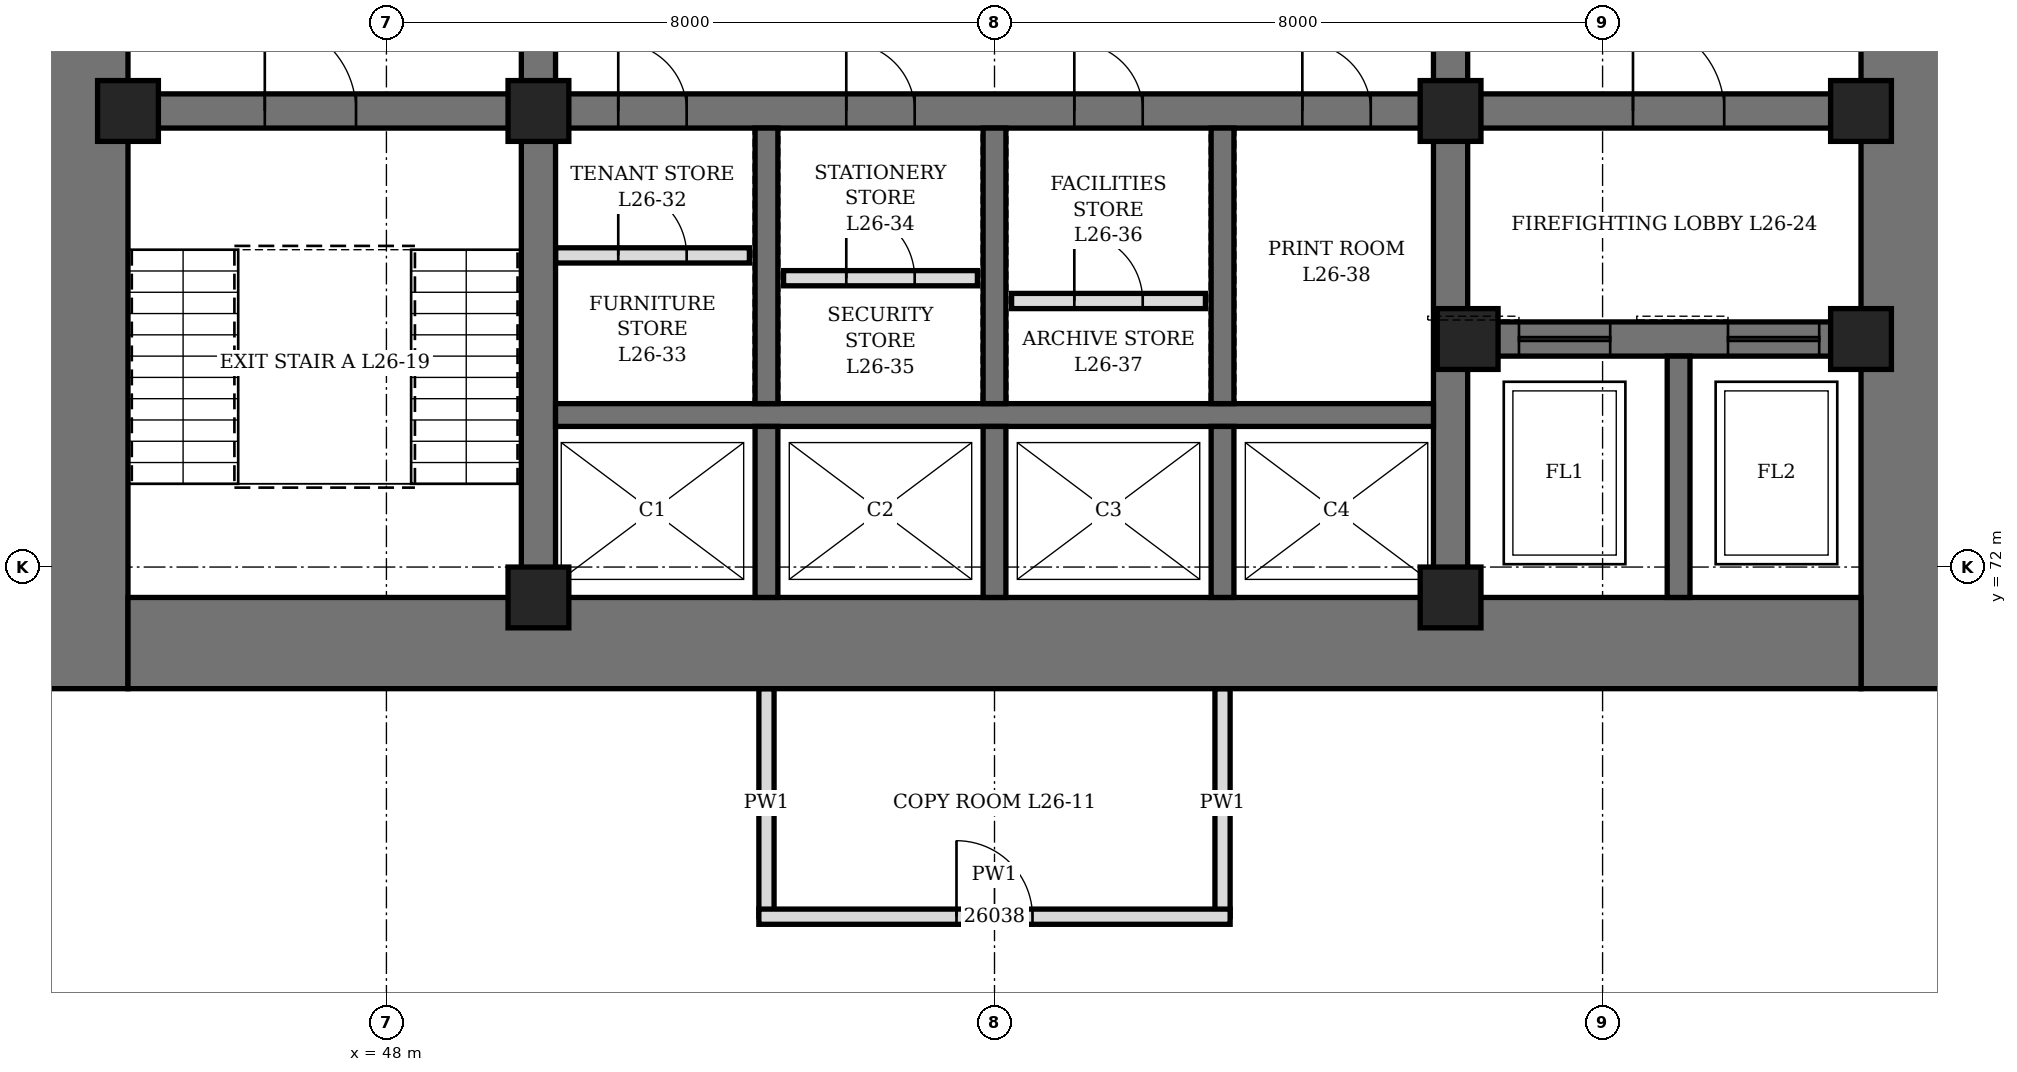
"""IFC4 building model, lengths in metres.
Left out: names, types, materials, properties, quantities, classifications, styles, units other than length and angle.
Written with IfcOpenShell. Run it as: python <this file> out.ifc"""

import sys

from ifc_helpers import new_model, si_unit, direction, frame, frame_2d, origin, origin_2d, place, context, subcontext, project, spatial, rectangle, hollow_rectangle, extrude, element, fill, save


model = new_model("IFC4")
c1 = context("Model", 3, precision=1e-05, world=origin(), true_north=direction((0.0, 1.0)))
c2 = subcontext(c1, "Body", "Model", "MODEL_VIEW")
j1 = project(units=[si_unit("LENGTHUNIT", "METRE"), si_unit("PLANEANGLEUNIT", "RADIAN")], contexts=[c1])
p1 = place(None, origin())
s1 = spatial("IfcSite", under=j1, at=p1, CompositionType="ELEMENT")
p2 = place(p1, origin())
s2 = spatial("IfcBuilding", under=s1, at=p2, CompositionType="ELEMENT")
p3 = place(p2, frame((0.0, 0.0, 120.7)))
s3 = spatial("IfcBuildingStorey", under=s2, at=p3, CompositionType="ELEMENT", Elevation=120.7)
p4 = place(p3, frame((44.0, 70.4, 0.0), z_axis=(0.0, 0.0, 1.0), x_axis=(0.0, 1.0, 0.0)))
e1 = element("IfcWall", 1, at=p4, inside=s3, PredefinedType="SHEAR", context=c2, shape_type="SweptSolid", body=[
    extrude(rectangle(XDim=19.2, YDim=1.2, at=frame_2d((9.6, 0.0))), origin(), (0.0, 0.0, 1.0), 4.2),
])
p5 = place(p4, frame((8.6, 0.0, 0.0)))
e2 = element("IfcOpeningElement", 2, at=p5, cuts=e1, PredefinedType="OPENING", context=c2, shape_type="SweptSolid", body=[
    extrude(rectangle(XDim=2.0, YDim=2.4, at=frame_2d((1.0, 1.2))), frame((0.0, 0.61, 0.0), z_axis=(0.0, -1.0, 0.0), x_axis=(1.0, 0.0, 0.0)), (0.0, 0.0, 1.0), 1.22),
])
p6 = place(p3, frame((68.0, 70.4, 0.0), z_axis=(0.0, 0.0, 1.0), x_axis=(0.0, 1.0, 0.0)))
e3 = element("IfcWall", 3, at=p6, inside=s3, PredefinedType="SHEAR", context=c2, shape_type="SweptSolid", body=[
    extrude(rectangle(XDim=19.2, YDim=1.2, at=frame_2d((9.6, 0.0))), origin(), (0.0, 0.0, 1.0), 4.2),
])
p7 = place(p6, frame((8.6, 0.0, 0.0)))
e4 = element("IfcOpeningElement", 4, at=p7, cuts=e3, PredefinedType="OPENING", context=c2, shape_type="SweptSolid", body=[
    extrude(rectangle(XDim=2.0, YDim=2.4, at=frame_2d((1.0, 1.2))), frame((0.0, 0.61, 0.0), z_axis=(0.0, -1.0, 0.0), x_axis=(1.0, 0.0, 0.0)), (0.0, 0.0, 1.0), 1.22),
])
p8 = place(p3, frame((44.6, 71.0, 0.0), z_axis=(0.0, 0.0, 1.0), x_axis=(1.0, 0.0, 0.0)))
e5 = element("IfcWall", 5, at=p8, inside=s3, PredefinedType="SHEAR", context=c2, shape_type="SweptSolid", body=[
    extrude(rectangle(XDim=22.8, YDim=1.2, at=frame_2d((11.4, 0.0))), origin(), (0.0, 0.0, 1.0), 4.2),
])
p9 = place(p3, frame((50.0, 71.6, 0.0), z_axis=(0.0, 0.0, 1.0), x_axis=(0.0, 1.0, 0.0)))
e6 = element("IfcWall", 6, at=p9, inside=s3, PredefinedType="SHEAR", context=c2, shape_type="SweptSolid", body=[
    extrude(rectangle(XDim=16.8, YDim=0.45, at=frame_2d((8.4, 0.0))), origin(), (0.0, 0.0, 1.0), 4.2),
])
p10 = place(p9, frame((7.5, 0.0, 0.0)))
e7 = element("IfcOpeningElement", 7, at=p10, cuts=e6, PredefinedType="OPENING", context=c2, shape_type="SweptSolid", body=[
    extrude(rectangle(XDim=1.8, YDim=2.4, at=frame_2d((0.9, 1.2))), frame((0.0, 0.235, 0.0), z_axis=(0.0, -1.0, 0.0), x_axis=(1.0, 0.0, 0.0)), (0.0, 0.0, 1.0), 0.47),
])
p11 = place(p3, frame((62.0, 71.6, 0.0), z_axis=(0.0, 0.0, 1.0), x_axis=(0.0, 1.0, 0.0)))
e8 = element("IfcWall", 8, at=p11, inside=s3, PredefinedType="SHEAR", context=c2, shape_type="SweptSolid", body=[
    extrude(rectangle(XDim=16.8, YDim=0.45, at=frame_2d((8.4, 0.0))), origin(), (0.0, 0.0, 1.0), 4.2),
])
p12 = place(p11, frame((7.5, 0.0, 0.0)))
e9 = element("IfcOpeningElement", 9, at=p12, cuts=e8, PredefinedType="OPENING", context=c2, shape_type="SweptSolid", body=[
    extrude(rectangle(XDim=1.8, YDim=2.4, at=frame_2d((0.9, 1.2))), frame((0.0, 0.235, 0.0), z_axis=(0.0, -1.0, 0.0), x_axis=(1.0, 0.0, 0.0)), (0.0, 0.0, 1.0), 0.47),
])
p13 = place(p3, frame((44.6, 78.0, 0.0), z_axis=(0.0, 0.0, 1.0), x_axis=(1.0, 0.0, 0.0)))
e10 = element("IfcWall", 10, at=p13, inside=s3, PredefinedType="SHEAR", context=c2, shape_type="SweptSolid", body=[
    extrude(rectangle(XDim=5.175, YDim=0.45, at=frame_2d((2.587, 0.0))), origin(), (0.0, 0.0, 1.0), 4.2),
])
p14 = place(p13, frame((1.8, 0.0, 0.0)))
e11 = element("IfcOpeningElement", 11, at=p14, cuts=e10, PredefinedType="OPENING", context=c2, shape_type="SweptSolid", body=[
    extrude(rectangle(XDim=1.2, YDim=2.1, at=frame_2d((0.6, 1.05))), frame((0.0, 0.235, 0.0), z_axis=(0.0, -1.0, 0.0), x_axis=(1.0, 0.0, 0.0)), (0.0, 0.0, 1.0), 0.47),
])
p15 = place(p3, frame((62.225, 75.0, 0.0), z_axis=(0.0, 0.0, 1.0), x_axis=(1.0, 0.0, 0.0)))
e12 = element("IfcWall", 12, at=p15, inside=s3, PredefinedType="SHEAR", context=c2, shape_type="SweptSolid", body=[
    extrude(rectangle(XDim=5.175, YDim=0.45, at=frame_2d((2.587, 0.0))), origin(), (0.0, 0.0, 1.0), 4.2),
])
p16 = place(p15, frame((0.675, 0.0, 0.0)))
e13 = element("IfcOpeningElement", 13, at=p16, cuts=e12, PredefinedType="OPENING", context=c2, shape_type="SweptSolid", body=[
    extrude(rectangle(XDim=1.2, YDim=2.2, at=frame_2d((0.6, 1.1))), frame((0.0, 0.235, 0.0), z_axis=(0.0, -1.0, 0.0), x_axis=(1.0, 0.0, 0.0)), (0.0, 0.0, 1.0), 0.47),
])
p17 = place(p15, frame((3.425, 0.0, 0.0)))
e14 = element("IfcOpeningElement", 14, at=p17, cuts=e12, PredefinedType="OPENING", context=c2, shape_type="SweptSolid", body=[
    extrude(rectangle(XDim=1.2, YDim=2.2, at=frame_2d((0.6, 1.1))), frame((0.0, 0.235, 0.0), z_axis=(0.0, -1.0, 0.0), x_axis=(1.0, 0.0, 0.0)), (0.0, 0.0, 1.0), 0.47),
])
p18 = place(p3, frame((62.225, 78.0, 0.0), z_axis=(0.0, 0.0, 1.0), x_axis=(1.0, 0.0, 0.0)))
e15 = element("IfcWall", 15, at=p18, inside=s3, PredefinedType="SHEAR", context=c2, shape_type="SweptSolid", body=[
    extrude(rectangle(XDim=5.175, YDim=0.45, at=frame_2d((2.587, 0.0))), origin(), (0.0, 0.0, 1.0), 4.2),
])
p19 = place(p18, frame((2.175, 0.0, 0.0)))
e16 = element("IfcOpeningElement", 16, at=p19, cuts=e15, PredefinedType="OPENING", context=c2, shape_type="SweptSolid", body=[
    extrude(rectangle(XDim=1.2, YDim=2.1, at=frame_2d((0.6, 1.05))), frame((0.0, 0.235, 0.0), z_axis=(0.0, -1.0, 0.0), x_axis=(1.0, 0.0, 0.0)), (0.0, 0.0, 1.0), 0.47),
])
p20 = place(p3, frame((50.225, 78.0, 0.0), z_axis=(0.0, 0.0, 1.0), x_axis=(1.0, 0.0, 0.0)))
e17 = element("IfcWall", 17, at=p20, inside=s3, PredefinedType="SHEAR", context=c2, shape_type="SweptSolid", body=[
    extrude(rectangle(XDim=11.55, YDim=0.45, at=frame_2d((5.775, 0.0))), origin(), (0.0, 0.0, 1.0), 4.2),
])
p21 = place(p20, frame((0.825, 0.0, 0.0)))
e18 = element("IfcOpeningElement", 18, at=p21, cuts=e17, PredefinedType="OPENING", context=c2, shape_type="SweptSolid", body=[
    extrude(rectangle(XDim=0.9, YDim=2.1, at=frame_2d((0.45, 1.05))), frame((0.0, 0.235, 0.0), z_axis=(0.0, -1.0, 0.0), x_axis=(1.0, 0.0, 0.0)), (0.0, 0.0, 1.0), 0.47),
])
p22 = place(p20, frame((3.825, 0.0, 0.0)))
e19 = element("IfcOpeningElement", 19, at=p22, cuts=e17, PredefinedType="OPENING", context=c2, shape_type="SweptSolid", body=[
    extrude(rectangle(XDim=0.9, YDim=2.1, at=frame_2d((0.45, 1.05))), frame((0.0, 0.235, 0.0), z_axis=(0.0, -1.0, 0.0), x_axis=(1.0, 0.0, 0.0)), (0.0, 0.0, 1.0), 0.47),
])
p23 = place(p20, frame((6.825, 0.0, 0.0)))
e20 = element("IfcOpeningElement", 20, at=p23, cuts=e17, PredefinedType="OPENING", context=c2, shape_type="SweptSolid", body=[
    extrude(rectangle(XDim=0.9, YDim=2.1, at=frame_2d((0.45, 1.05))), frame((0.0, 0.235, 0.0), z_axis=(0.0, -1.0, 0.0), x_axis=(1.0, 0.0, 0.0)), (0.0, 0.0, 1.0), 0.47),
])
p24 = place(p20, frame((9.825, 0.0, 0.0)))
e21 = element("IfcOpeningElement", 21, at=p24, cuts=e17, PredefinedType="OPENING", context=c2, shape_type="SweptSolid", body=[
    extrude(rectangle(XDim=0.9, YDim=2.1, at=frame_2d((0.45, 1.05))), frame((0.0, 0.235, 0.0), z_axis=(0.0, -1.0, 0.0), x_axis=(1.0, 0.0, 0.0)), (0.0, 0.0, 1.0), 0.47),
])
p25 = place(p3, frame((50.225, 74.0, 0.0), z_axis=(0.0, 0.0, 1.0), x_axis=(1.0, 0.0, 0.0)))
e22 = element("IfcWall", 22, at=p25, inside=s3, PredefinedType="SHEAR", context=c2, shape_type="SweptSolid", body=[
    extrude(rectangle(XDim=11.55, YDim=0.3, at=frame_2d((5.775, 0.0))), origin(), (0.0, 0.0, 1.0), 4.2),
])
p26 = place(p3, frame((53.0, 71.6, 0.0), z_axis=(0.0, 0.0, 1.0), x_axis=(0.0, 1.0, 0.0)))
e23 = element("IfcWall", 23, at=p26, inside=s3, PredefinedType="SHEAR", context=c2, shape_type="SweptSolid", body=[
    extrude(rectangle(XDim=2.25, YDim=0.3, at=frame_2d((1.125, 0.0))), origin(), (0.0, 0.0, 1.0), 4.2),
])
p27 = place(p3, frame((53.0, 74.15, 0.0), z_axis=(0.0, 0.0, 1.0), x_axis=(0.0, 1.0, 0.0)))
e24 = element("IfcWall", 24, at=p27, inside=s3, PredefinedType="SHEAR", context=c2, shape_type="SweptSolid", body=[
    extrude(rectangle(XDim=3.625, YDim=0.3, at=frame_2d((1.812, 0.0))), origin(), (0.0, 0.0, 1.0), 4.2),
])
p28 = place(p3, frame((56.0, 71.6, 0.0), z_axis=(0.0, 0.0, 1.0), x_axis=(0.0, 1.0, 0.0)))
e25 = element("IfcWall", 25, at=p28, inside=s3, PredefinedType="SHEAR", context=c2, shape_type="SweptSolid", body=[
    extrude(rectangle(XDim=2.25, YDim=0.3, at=frame_2d((1.125, 0.0))), origin(), (0.0, 0.0, 1.0), 4.2),
])
p29 = place(p3, frame((56.0, 74.15, 0.0), z_axis=(0.0, 0.0, 1.0), x_axis=(0.0, 1.0, 0.0)))
e26 = element("IfcWall", 26, at=p29, inside=s3, PredefinedType="SHEAR", context=c2, shape_type="SweptSolid", body=[
    extrude(rectangle(XDim=3.625, YDim=0.3, at=frame_2d((1.812, 0.0))), origin(), (0.0, 0.0, 1.0), 4.2),
])
p30 = place(p3, frame((59.0, 71.6, 0.0), z_axis=(0.0, 0.0, 1.0), x_axis=(0.0, 1.0, 0.0)))
e27 = element("IfcWall", 27, at=p30, inside=s3, PredefinedType="SHEAR", context=c2, shape_type="SweptSolid", body=[
    extrude(rectangle(XDim=2.25, YDim=0.3, at=frame_2d((1.125, 0.0))), origin(), (0.0, 0.0, 1.0), 4.2),
])
p31 = place(p3, frame((59.0, 74.15, 0.0), z_axis=(0.0, 0.0, 1.0), x_axis=(0.0, 1.0, 0.0)))
e28 = element("IfcWall", 28, at=p31, inside=s3, PredefinedType="SHEAR", context=c2, shape_type="SweptSolid", body=[
    extrude(rectangle(XDim=3.625, YDim=0.3, at=frame_2d((1.812, 0.0))), origin(), (0.0, 0.0, 1.0), 4.2),
])
p32 = place(p3, frame((65.0, 71.6, 0.0), z_axis=(0.0, 0.0, 1.0), x_axis=(0.0, 1.0, 0.0)))
e29 = element("IfcWall", 29, at=p32, inside=s3, PredefinedType="SHEAR", context=c2, shape_type="SweptSolid", body=[
    extrude(rectangle(XDim=3.175, YDim=0.3, at=frame_2d((1.587, 0.0))), origin(), (0.0, 0.0, 1.0), 4.2),
])
for number, where, z_axis, x_axis in (
    (30, (44.6, 78.0, 0.0), (0.0, 0.0, 1.0), (1.0, 0.0, 0.0)),
    (31, (50.0, 71.6, 0.0), (0.0, 0.0, 1.0), (1.0, 0.0, 0.0)),
    (32, (50.0, 78.0, 0.0), (0.0, 0.0, 1.0), (1.0, 0.0, 0.0)),
    (33, (62.0, 71.6, 0.0), (0.0, 0.0, 1.0), (1.0, 0.0, 0.0)),
    (34, (62.0, 78.0, 0.0), (0.0, 0.0, 1.0), (1.0, 0.0, 0.0)),
    (35, (62.225, 75.0, 0.0), (0.0, 0.0, 1.0), (1.0, 0.0, 0.0)),
    (36, (67.4, 75.0, 0.0), (0.0, 0.0, 1.0), (1.0, 0.0, 0.0)),
    (37, (67.4, 78.0, 0.0), (0.0, 0.0, 1.0), (1.0, 0.0, 0.0)),
):
    element("IfcColumn", number, at=place(p3, frame(where, z_axis=z_axis, x_axis=x_axis)), inside=s3, PredefinedType="COLUMN", context=c2, shape_type="SweptSolid", body=[
        extrude(hollow_rectangle(XDim=0.8, YDim=0.8, WallThickness=0.1, at=origin_2d()), origin(), (0.0, 0.0, 1.0), 4.2),
    ])
p33 = place(p3, frame((50.225, 76.1, 0.0), z_axis=(0.0, 0.0, 1.0), x_axis=(1.0, 0.0, 0.0)))
e38 = element("IfcWall", 38, at=p33, inside=s3, PredefinedType="PARTITIONING", context=c2, shape_type="SweptSolid", body=[
    extrude(rectangle(XDim=2.55, YDim=0.2, at=frame_2d((1.275, 0.0))), origin(), (0.0, 0.0, 1.0), 4.04),
])
p34 = place(p33, frame((0.825, 0.0, 0.0)))
e39 = element("IfcOpeningElement", 39, at=p34, cuts=e38, PredefinedType="OPENING", context=c2, shape_type="SweptSolid", body=[
    extrude(rectangle(XDim=0.9, YDim=2.1, at=frame_2d((0.45, 1.05))), frame((0.0, 0.11, 0.0), z_axis=(0.0, -1.0, 0.0), x_axis=(1.0, 0.0, 0.0)), (0.0, 0.0, 1.0), 0.22),
])
p35 = place(p3, frame((53.225, 75.8, 0.0), z_axis=(0.0, 0.0, 1.0), x_axis=(1.0, 0.0, 0.0)))
e40 = element("IfcWall", 40, at=p35, inside=s3, PredefinedType="PARTITIONING", context=c2, shape_type="SweptSolid", body=[
    extrude(rectangle(XDim=2.55, YDim=0.2, at=frame_2d((1.275, 0.0))), origin(), (0.0, 0.0, 1.0), 4.04),
])
p36 = place(p35, frame((0.825, 0.0, 0.0)))
e41 = element("IfcOpeningElement", 41, at=p36, cuts=e40, PredefinedType="OPENING", context=c2, shape_type="SweptSolid", body=[
    extrude(rectangle(XDim=0.9, YDim=2.1, at=frame_2d((0.45, 1.05))), frame((0.0, 0.11, 0.0), z_axis=(0.0, -1.0, 0.0), x_axis=(1.0, 0.0, 0.0)), (0.0, 0.0, 1.0), 0.22),
])
p37 = place(p3, frame((56.225, 75.5, 0.0), z_axis=(0.0, 0.0, 1.0), x_axis=(1.0, 0.0, 0.0)))
e42 = element("IfcWall", 42, at=p37, inside=s3, PredefinedType="PARTITIONING", context=c2, shape_type="SweptSolid", body=[
    extrude(rectangle(XDim=2.55, YDim=0.2, at=frame_2d((1.275, 0.0))), origin(), (0.0, 0.0, 1.0), 4.04),
])
p38 = place(p37, frame((0.825, 0.0, 0.0)))
e43 = element("IfcOpeningElement", 43, at=p38, cuts=e42, PredefinedType="OPENING", context=c2, shape_type="SweptSolid", body=[
    extrude(rectangle(XDim=0.9, YDim=2.1, at=frame_2d((0.45, 1.05))), frame((0.0, 0.11, 0.0), z_axis=(0.0, -1.0, 0.0), x_axis=(1.0, 0.0, 0.0)), (0.0, 0.0, 1.0), 0.22),
])
for number, where, z_axis, x_axis in (
    (44, (53.0, 67.4, 0.0), (0.0, 0.0, 1.0), (0.0, 1.0, 0.0)),
    (45, (59.0, 67.4, 0.0), (0.0, 0.0, 1.0), (0.0, 1.0, 0.0)),
):
    element("IfcWall", number, at=place(p3, frame(where, z_axis=z_axis, x_axis=x_axis)), inside=s3, PredefinedType="PARTITIONING", context=c2, shape_type="SweptSolid", body=[
        extrude(rectangle(XDim=3.0, YDim=0.2, at=frame_2d((1.5, 0.0))), origin(), (0.0, 0.0, 1.0), 3.278),
    ])
p39 = place(p3, frame((52.9, 67.4, 0.0), z_axis=(0.0, 0.0, 1.0), x_axis=(1.0, 0.0, 0.0)))
e46 = element("IfcWall", 46, at=p39, inside=s3, PredefinedType="PARTITIONING", context=c2, shape_type="SweptSolid", body=[
    extrude(rectangle(XDim=6.2, YDim=0.2, at=frame_2d((3.1, 0.0))), origin(), (0.0, 0.0, 1.0), 4.04),
])
p40 = place(p39, frame((2.6, 0.0, 0.0)))
e47 = element("IfcOpeningElement", 47, at=p40, cuts=e46, PredefinedType="OPENING", context=c2, shape_type="SweptSolid", body=[
    extrude(rectangle(XDim=1.0, YDim=2.1, at=frame_2d((0.5, 1.05))), frame((0.0, 0.11, 0.0), z_axis=(0.0, -1.0, 0.0), x_axis=(1.0, 0.0, 0.0)), (0.0, 0.0, 1.0), 0.22),
])
p41 = place(p21, origin())
e48 = element("IfcDoor", 48, at=p41, inside=s3, OperationType="SINGLE_SWING_LEFT", PredefinedType="DOOR", context=c2, shape_type="SweptSolid", body=[
    extrude(rectangle(XDim=0.9, YDim=2.1, at=frame_2d((0.45, 1.05))), frame((0.0, 0.225, 0.0), z_axis=(0.0, -1.0, 0.0), x_axis=(1.0, 0.0, 0.0)), (0.0, 0.0, 1.0), 0.449),
])
fill(e18, e48)
p42 = place(p34, origin())
e49 = element("IfcDoor", 49, at=p42, inside=s3, OperationType="SINGLE_SWING_LEFT", PredefinedType="DOOR", context=c2, shape_type="SweptSolid", body=[
    extrude(rectangle(XDim=0.9, YDim=2.1, at=frame_2d((0.45, 1.05))), frame((0.0, 0.1, 0.0), z_axis=(0.0, -1.0, 0.0), x_axis=(1.0, 0.0, 0.0)), (0.0, 0.0, 1.0), 0.199),
])
fill(e39, e49)
p43 = place(p22, origin())
e50 = element("IfcDoor", 50, at=p43, inside=s3, OperationType="SINGLE_SWING_LEFT", PredefinedType="DOOR", context=c2, shape_type="SweptSolid", body=[
    extrude(rectangle(XDim=0.9, YDim=2.1, at=frame_2d((0.45, 1.05))), frame((0.0, 0.225, 0.0), z_axis=(0.0, -1.0, 0.0), x_axis=(1.0, 0.0, 0.0)), (0.0, 0.0, 1.0), 0.449),
])
fill(e19, e50)
p44 = place(p36, origin())
e51 = element("IfcDoor", 51, at=p44, inside=s3, OperationType="SINGLE_SWING_LEFT", PredefinedType="DOOR", context=c2, shape_type="SweptSolid", body=[
    extrude(rectangle(XDim=0.9, YDim=2.1, at=frame_2d((0.45, 1.05))), frame((0.0, 0.1, 0.0), z_axis=(0.0, -1.0, 0.0), x_axis=(1.0, 0.0, 0.0)), (0.0, 0.0, 1.0), 0.199),
])
fill(e41, e51)
p45 = place(p23, origin())
e52 = element("IfcDoor", 52, at=p45, inside=s3, OperationType="SINGLE_SWING_LEFT", PredefinedType="DOOR", context=c2, shape_type="SweptSolid", body=[
    extrude(rectangle(XDim=0.9, YDim=2.1, at=frame_2d((0.45, 1.05))), frame((0.0, 0.225, 0.0), z_axis=(0.0, -1.0, 0.0), x_axis=(1.0, 0.0, 0.0)), (0.0, 0.0, 1.0), 0.449),
])
fill(e20, e52)
p46 = place(p38, origin())
e53 = element("IfcDoor", 53, at=p46, inside=s3, OperationType="SINGLE_SWING_LEFT", PredefinedType="DOOR", context=c2, shape_type="SweptSolid", body=[
    extrude(rectangle(XDim=0.9, YDim=2.1, at=frame_2d((0.45, 1.05))), frame((0.0, 0.1, 0.0), z_axis=(0.0, -1.0, 0.0), x_axis=(1.0, 0.0, 0.0)), (0.0, 0.0, 1.0), 0.199),
])
fill(e43, e53)
p47 = place(p24, origin())
e54 = element("IfcDoor", 54, at=p47, inside=s3, OperationType="SINGLE_SWING_LEFT", PredefinedType="DOOR", context=c2, shape_type="SweptSolid", body=[
    extrude(rectangle(XDim=0.9, YDim=2.1, at=frame_2d((0.45, 1.05))), frame((0.0, 0.225, 0.0), z_axis=(0.0, -1.0, 0.0), x_axis=(1.0, 0.0, 0.0)), (0.0, 0.0, 1.0), 0.449),
])
fill(e21, e54)
p48 = place(p14, origin())
e55 = element("IfcDoor", 55, at=p48, inside=s3, OperationType="SINGLE_SWING_LEFT", PredefinedType="DOOR", context=c2, shape_type="SweptSolid", body=[
    extrude(rectangle(XDim=1.2, YDim=2.1, at=frame_2d((0.6, 1.05))), frame((0.0, 0.225, 0.0), z_axis=(0.0, -1.0, 0.0), x_axis=(1.0, 0.0, 0.0)), (0.0, 0.0, 1.0), 0.449),
])
fill(e11, e55)
p49 = place(p19, origin())
e56 = element("IfcDoor", 56, at=p49, inside=s3, OperationType="SINGLE_SWING_RIGHT", PredefinedType="DOOR", context=c2, shape_type="SweptSolid", body=[
    extrude(rectangle(XDim=1.2, YDim=2.1, at=frame_2d((0.6, 1.05))), frame((0.0, 0.225, 0.0), z_axis=(0.0, -1.0, 0.0), x_axis=(1.0, 0.0, 0.0)), (0.0, 0.0, 1.0), 0.449),
])
fill(e16, e56)
p50 = place(p16, origin())
e57 = element("IfcDoor", 57, at=p50, inside=s3, OperationType="SLIDING_TO_LEFT", PredefinedType="DOOR", context=c2, shape_type="SweptSolid", body=[
    extrude(rectangle(XDim=1.2, YDim=2.2, at=frame_2d((0.6, 1.1))), frame((0.0, 0.225, 0.0), z_axis=(0.0, -1.0, 0.0), x_axis=(1.0, 0.0, 0.0)), (0.0, 0.0, 1.0), 0.449),
])
fill(e13, e57)
p51 = place(p17, origin())
e58 = element("IfcDoor", 58, at=p51, inside=s3, OperationType="SLIDING_TO_LEFT", PredefinedType="DOOR", context=c2, shape_type="SweptSolid", body=[
    extrude(rectangle(XDim=1.2, YDim=2.2, at=frame_2d((0.6, 1.1))), frame((0.0, 0.225, 0.0), z_axis=(0.0, -1.0, 0.0), x_axis=(1.0, 0.0, 0.0)), (0.0, 0.0, 1.0), 0.449),
])
fill(e14, e58)
p52 = place(p40, origin())
e59 = element("IfcDoor", 59, at=p52, inside=s3, OperationType="SINGLE_SWING_LEFT", PredefinedType="DOOR", context=c2, shape_type="SweptSolid", body=[
    extrude(rectangle(XDim=1.0, YDim=2.1, at=frame_2d((0.5, 1.05))), frame((0.0, 0.1, 0.0), z_axis=(0.0, -1.0, 0.0), x_axis=(1.0, 0.0, 0.0)), (0.0, 0.0, 1.0), 0.199),
])
fill(e47, e59)
save(model, sys.argv[1])
